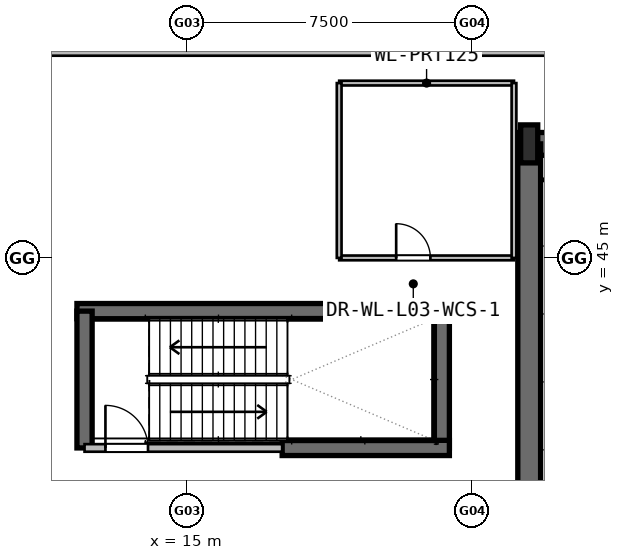
"""IFC4 building model, lengths in metres.
Left out: names, types, materials, properties, quantities, classifications, styles, units other than length and angle.
Written with IfcOpenShell. Run it as: python <this file> out.ifc"""

import sys

from ifc_helpers import new_model, si_unit, direction, frame, frame_2d, origin, origin_2d, place, context, subcontext, project, spatial, rectangle, i_section, extrude, element, fill, save


model = new_model("IFC4")
c1 = context("Model", 3, precision=1e-05, world=origin(), true_north=direction((0.0, 1.0)))
c2 = subcontext(c1, "Body", "Model", "MODEL_VIEW")
j1 = project(units=[si_unit("LENGTHUNIT", "METRE"), si_unit("PLANEANGLEUNIT", "RADIAN")], contexts=[c1])
p1 = place(None, origin())
s1 = spatial("IfcSite", under=j1, at=p1, CompositionType="ELEMENT")
p2 = place(p1, origin())
s2 = spatial("IfcBuilding", under=s1, at=p2, CompositionType="ELEMENT")
p3 = place(p2, frame((0.0, 0.0, 15.6)))
s3 = spatial("IfcBuildingStorey", under=s2, at=p3, CompositionType="ELEMENT", Elevation=15.6)
p4 = place(p3, frame((23.7, 48.0, 0.0), z_axis=(0.0, 0.0, 1.0), x_axis=(1.0, 0.0, 0.0)))
e1 = element("IfcWall", 1, at=p4, inside=s3, PredefinedType="SHEAR", context=c2, shape_type="SweptSolid", body=[
    extrude(rectangle(XDim=27.6, YDim=0.6, at=frame_2d((13.8, 0.0))), origin(), (0.0, 0.0, 1.0), 4.8),
])
p5 = place(p3, frame((24.0, 37.68, 0.0), z_axis=(0.0, 0.0, 1.0), x_axis=(0.0, 1.0, 0.0)))
e2 = element("IfcWall", 2, at=p5, inside=s3, PredefinedType="SHEAR", context=c2, shape_type="SweptSolid", body=[
    extrude(rectangle(XDim=10.32, YDim=0.6, at=frame_2d((5.16, 0.0))), origin(), (0.0, 0.0, 1.0), 4.8),
])
p6 = place(p3, frame((24.0, 48.0, 0.0), z_axis=(0.0, 0.0, 1.0), x_axis=(1.0, 0.0, 0.0)))
e3 = element("IfcColumn", 3, at=p6, inside=s3, PredefinedType="COLUMN", context=c2, shape_type="SweptSolid", body=[
    extrude(i_section(OverallWidth=0.45, OverallDepth=1.0, WebThickness=0.022, FlangeThickness=0.04, at=origin_2d()), origin(), (0.0, 0.0, 1.0), 4.8),
])
p7 = place(p3, frame((12.1, 43.6, 0.0), z_axis=(0.0, 0.0, 1.0), x_axis=(1.0, 0.0, 0.0)))
e4 = element("IfcWall", 4, at=p7, inside=s3, PredefinedType="SHEAR", context=c2, shape_type="SweptSolid", body=[
    extrude(rectangle(XDim=9.8, YDim=0.4, at=frame_2d((4.9, 0.0))), origin(), (0.0, 0.0, 1.0), 4.8),
])
for number, where, z_axis, x_axis in (
    (5, (12.3, 40.0, 0.0), (0.0, 0.0, 1.0), (0.0, 1.0, 0.0)),
    (6, (21.7, 40.0, 0.0), (0.0, 0.0, 1.0), (0.0, 1.0, 0.0)),
):
    element("IfcWall", number, at=place(p3, frame(where, z_axis=z_axis, x_axis=x_axis)), inside=s3, PredefinedType="SHEAR", context=c2, shape_type="SweptSolid", body=[
        extrude(rectangle(XDim=3.6, YDim=0.4, at=frame_2d((1.8, 0.0))), origin(), (0.0, 0.0, 1.0), 4.8),
    ])
p8 = place(p3, frame((17.5, 40.0, 0.0), z_axis=(0.0, 0.0, 1.0), x_axis=(1.0, 0.0, 0.0)))
e7 = element("IfcWall", 7, at=p8, inside=s3, PredefinedType="SHEAR", context=c2, shape_type="SweptSolid", body=[
    extrude(rectangle(XDim=4.4, YDim=0.4, at=frame_2d((2.2, 0.0))), origin(), (0.0, 0.0, 1.0), 4.8),
])
p9 = place(p3, frame((7.32, 50.5, 0.0), z_axis=(0.0, 0.0, 1.0), x_axis=(1.0, 0.0, 0.0)))
e8 = element("IfcWall", 8, at=p9, inside=s3, PredefinedType="SOLIDWALL", context=c2, shape_type="SweptSolid", body=[
    extrude(rectangle(XDim=88.53, YDim=0.36, at=frame_2d((44.265, 0.0))), origin(), (0.0, 0.0, 1.0), 4.48),
])
p10 = place(p3, frame((12.3, 40.0, 0.0), z_axis=(0.0, 0.0, 1.0), x_axis=(1.0, 0.0, 0.0)))
e9 = element("IfcWall", 9, at=p10, inside=s3, PredefinedType="PARTITIONING", context=c2, shape_type="SweptSolid", body=[
    extrude(rectangle(XDim=5.2, YDim=0.2, at=frame_2d((2.6, 0.0))), origin(), (0.0, 0.0, 1.0), 4.48),
])
p11 = place(p10, frame((0.55, 0.0, 0.0)))
e10 = element("IfcOpeningElement", 10, at=p11, cuts=e9, PredefinedType="OPENING", context=c2, shape_type="SweptSolid", body=[
    extrude(rectangle(XDim=1.12, YDim=2.1, at=frame_2d((0.56, 1.05))), frame((0.0, 0.11, 0.0), z_axis=(0.0, -1.0, 0.0), x_axis=(1.0, 0.0, 0.0)), (0.0, 0.0, 1.0), 0.22),
])
p12 = place(p3, frame((19.0, 45.0, 0.0), z_axis=(0.0, 0.0, 1.0), x_axis=(1.0, 0.0, 0.0)))
e11 = element("IfcWall", 11, at=p12, inside=s3, PredefinedType="PARTITIONING", context=c2, shape_type="SweptSolid", body=[
    extrude(rectangle(XDim=4.6, YDim=0.125, at=frame_2d((2.3, 0.0))), origin(), (0.0, 0.0, 1.0), 4.48),
])
p13 = place(p12, frame((1.5, 0.0, 0.0)))
e12 = element("IfcOpeningElement", 12, at=p13, cuts=e11, PredefinedType="OPENING", context=c2, shape_type="SweptSolid", body=[
    extrude(rectangle(XDim=0.9, YDim=2.05, at=frame_2d((0.45, 1.025))), frame((0.0, 0.073, 0.0), z_axis=(0.0, -1.0, 0.0), x_axis=(1.0, 0.0, 0.0)), (0.0, 0.0, 1.0), 0.145),
])
for number, where, z_axis, x_axis in (
    (13, (19.0, 49.6, 0.0), (0.0, 0.0, 1.0), (1.0, 0.0, 0.0)),
    (14, (19.0, 45.0, 0.0), (0.0, 0.0, 1.0), (0.0, 1.0, 0.0)),
    (15, (23.6, 45.0, 0.0), (0.0, 0.0, 1.0), (0.0, 1.0, 0.0)),
):
    element("IfcWall", number, at=place(p3, frame(where, z_axis=z_axis, x_axis=x_axis)), inside=s3, PredefinedType="PARTITIONING", context=c2, shape_type="SweptSolid", body=[
        extrude(rectangle(XDim=4.6, YDim=0.125, at=frame_2d((2.3, 0.0))), origin(), (0.0, 0.0, 1.0), 4.48),
    ])
p14 = place(p11, origin())
e16 = element("IfcDoor", 16, at=p14, inside=s3, OperationType="SINGLE_SWING_RIGHT", PredefinedType="DOOR", context=c2, shape_type="SweptSolid", body=[
    extrude(rectangle(XDim=1.12, YDim=2.1, at=frame_2d((0.56, 1.05))), frame((0.0, 0.025, 0.0), z_axis=(0.0, -1.0, 0.0), x_axis=(1.0, 0.0, 0.0)), (0.0, 0.0, 1.0), 0.05),
])
fill(e10, e16)
p15 = place(p13, origin())
e17 = element("IfcDoor", 17, at=p15, inside=s3, OperationType="SINGLE_SWING_RIGHT", PredefinedType="DOOR", context=c2, shape_type="SweptSolid", body=[
    extrude(rectangle(XDim=0.9, YDim=2.05, at=frame_2d((0.45, 1.025))), frame((0.0, 0.025, 0.0), z_axis=(0.0, -1.0, 0.0), x_axis=(1.0, 0.0, 0.0)), (0.0, 0.0, 1.0), 0.05),
])
fill(e12, e17)
save(model, sys.argv[1])
